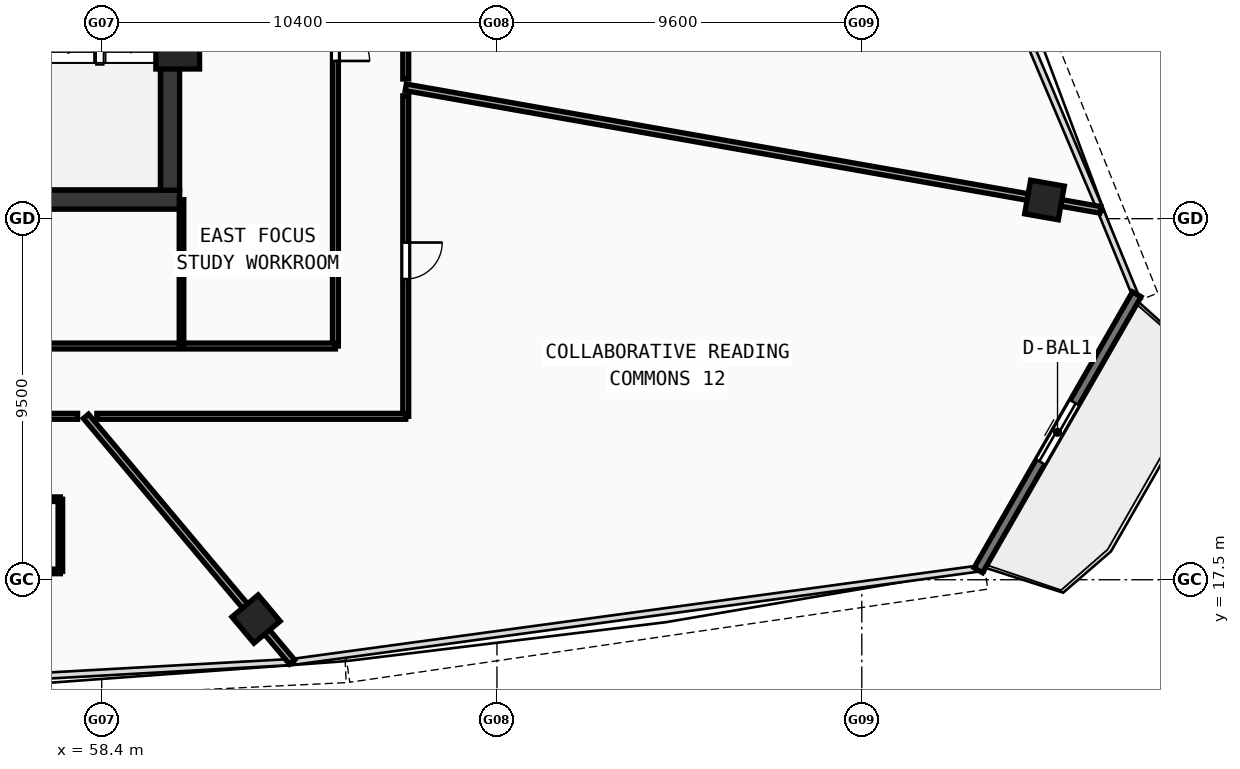
"""IFC4 building model, lengths in metres.
Left out: names, types, materials, properties, quantities, classifications, styles, units other than length and angle.
Written with IfcOpenShell. Run it as: python <this file> out.ifc"""

import sys

from ifc_helpers import new_model, si_unit, direction, frame, frame_2d, origin, origin_with_axes, origin_2d, place, context, subcontext, project, spatial, rectangle, hollow_rectangle, extrude, source, transform, mapped, element, fill, save


model = new_model("IFC4")
c1 = context("Model", 3, precision=1e-05, world=origin(), true_north=direction((0.0, 1.0)))
c2 = subcontext(c1, "Body", "Model", "MODEL_VIEW")
j1 = project(units=[si_unit("LENGTHUNIT", "METRE"), si_unit("PLANEANGLEUNIT", "RADIAN")], contexts=[c1])
p1 = place(None, origin())
s1 = spatial("IfcSite", under=j1, at=p1, CompositionType="ELEMENT")
p2 = place(p1, origin())
s2 = spatial("IfcBuilding", under=s1, at=p2, CompositionType="ELEMENT")
p3 = place(p2, frame((0.0, 0.0, 211.36)))
s3 = spatial("IfcBuildingStorey", under=s2, at=p3, CompositionType="ELEMENT", Elevation=211.36)
p4 = place(p3, frame((35.55, 27.5, 0.0), z_axis=(0.0, 0.0, 1.0), x_axis=(1.0, 0.0, 0.0)))
e1 = element("IfcWall", 1, at=p4, inside=s3, PredefinedType="SHEAR", context=c2, shape_type="SweptSolid", body=[
    extrude(rectangle(XDim=24.9, YDim=0.5, at=frame_2d((12.45, 0.0))), origin(), (0.0, 0.0, 1.0), 3.54),
])
p5 = place(p3, frame((60.2, 27.75, 0.0), z_axis=(0.0, 0.0, 1.0), x_axis=(0.0, 1.0, 0.0)))
e2 = element("IfcWall", 2, at=p5, inside=s3, PredefinedType="SHEAR", context=c2, shape_type="SweptSolid", body=[
    extrude(rectangle(XDim=12.2, YDim=0.5, at=frame_2d((6.1, 0.0))), origin(), (0.0, 0.0, 1.0), 3.54),
])
m1 = source(origin(), c2, "Body", "SweptSolid", [
    extrude(hollow_rectangle(XDim=1.15, YDim=1.15, WallThickness=0.048, at=origin_2d()), origin(), (0.0, 0.0, 1.0), 3.8),
])
p6 = place(p3, frame((60.4, 31.513, -0.26), z_axis=(0.0, 0.0, 1.0), x_axis=(1.0, 0.0, 0.0)))
e3 = element("IfcColumn", 3, at=p6, inside=s3, PredefinedType="COLUMN", context=c2, shape_type="MappedRepresentation", body=[
    mapped(m1, transform((0.0, 0.0, 0.0), scale=1.0)),
])
m2 = source(origin(), c2, "Body", "SweptSolid", [
    extrude(hollow_rectangle(XDim=0.9, YDim=0.9, WallThickness=0.036, at=origin_2d()), origin(), (0.0, 0.0, 1.0), 3.8),
])
for number, where, z_axis, x_axis in (
    (4, (62.461, 16.466, -0.26), (0.0, 0.0, 1.0), (0.766, 0.643, 0.0)),
    (5, (83.207, 27.492, -0.26), (0.0, 0.0, 1.0), (0.174, 0.985, 0.0)),
):
    element("IfcColumn", number, at=place(p3, frame(where, z_axis=z_axis, x_axis=x_axis)), inside=s3, PredefinedType="COLUMN", context=c2, shape_type="MappedRepresentation", body=[
        mapped(m2, transform((0.0, 0.0, 0.0), scale=1.0)),
    ])
p7 = place(p3, frame((81.466, 17.75, 0.0), z_axis=(0.0, 0.0, 1.0), x_axis=(0.497934125263, 0.867214856249, 0.0)))
e6 = element("IfcWall", 6, at=p7, inside=s3, PredefinedType="STANDARD", context=c2, shape_type="SweptSolid", body=[
    extrude(rectangle(XDim=8.373, YDim=0.26, at=frame_2d((4.186, 0.0))), origin(), (0.0, 0.0, 1.0), 3.54),
])
p8 = place(p7, frame((3.286, 0.0, 0.0)))
e7 = element("IfcOpeningElement", 7, at=p8, cuts=e6, PredefinedType="OPENING", context=c2, shape_type="SweptSolid", body=[
    extrude(rectangle(XDim=1.8, YDim=2.15, at=frame_2d((0.9, 1.075))), frame((0.0, 0.14, 0.0), z_axis=(0.0, -1.0, 0.0), x_axis=(1.0, 0.0, 0.0)), (0.0, 0.0, 1.0), 0.28),
])
p9 = place(p3, frame((64.55, 23.65, 0.0), z_axis=(0.0, 0.0, 1.0), x_axis=(0.0, 1.0, 0.0)))
e8 = element("IfcWall", 8, at=p9, inside=s3, PredefinedType="PARTITIONING", context=c2, shape_type="SweptSolid", body=[
    extrude(rectangle(XDim=16.6, YDim=0.155, at=frame_2d((8.3, 0.0))), origin(), (0.0, 0.0, 1.0), 2.89),
])
p10 = place(p9, frame((7.5, 0.0, 0.0)))
e9 = element("IfcOpeningElement", 9, at=p10, cuts=e8, PredefinedType="OPENING", context=c2, shape_type="SweptSolid", body=[
    extrude(rectangle(XDim=0.9, YDim=2.08, at=frame_2d((0.45, 1.04))), frame((0.0, 0.087, 0.0), z_axis=(0.0, -1.0, 0.0), x_axis=(1.0, 0.0, 0.0)), (0.0, 0.0, 1.0), 0.175),
])
p11 = place(p3, frame((31.45, 23.65, 0.0), z_axis=(0.0, 0.0, 1.0), x_axis=(1.0, 0.0, 0.0)))
e10 = element("IfcWall", 10, at=p11, inside=s3, PredefinedType="PARTITIONING", context=c2, shape_type="SweptSolid", body=[
    extrude(rectangle(XDim=33.1, YDim=0.155, at=frame_2d((16.55, 0.0))), origin(), (0.0, 0.0, 1.0), 2.89),
])
p12 = place(p11, frame((16.0, 0.0, 0.0)))
e11 = element("IfcOpeningElement", 11, at=p12, cuts=e10, PredefinedType="OPENING", context=c2, shape_type="SweptSolid", body=[
    extrude(rectangle(XDim=0.92, YDim=2.1, at=frame_2d((0.46, 1.05))), frame((0.0, 0.087, 0.0), z_axis=(0.0, -1.0, 0.0), x_axis=(1.0, 0.0, 0.0)), (0.0, 0.0, 1.0), 0.175),
])
p13 = place(p3, frame((60.5, 23.65, 0.0), z_axis=(0.0, 0.0, 1.0), x_axis=(0.0, 1.0, 0.0)))
e12 = element("IfcWall", 12, at=p13, inside=s3, PredefinedType="PARTITIONING", context=c2, shape_type="SweptSolid", body=[
    extrude(rectangle(XDim=3.85, YDim=0.12, at=frame_2d((1.925, 0.0))), origin(), (0.0, 0.0, 1.0), 3.14),
])
p14 = place(p3, frame((57.985, 21.8, 0.0), z_axis=(0.0, 0.0, 1.0), x_axis=(0.642770599155, -0.766058716328, 0.0)))
e13 = element("IfcWall", 13, at=p14, inside=s3, PredefinedType="PARTITIONING", context=c2, shape_type="SweptSolid", body=[
    extrude(rectangle(XDim=8.438, YDim=0.175, at=frame_2d((4.219, 0.0))), origin(), (0.0, 0.0, 1.0), 2.89),
])
p15 = place(p3, frame((66.4, 30.456, 0.0), z_axis=(0.0, 0.0, 1.0), x_axis=(0.984808051039, -0.173646487465, 0.0)))
e14 = element("IfcWall", 14, at=p15, inside=s3, PredefinedType="PARTITIONING", context=c2, shape_type="SweptSolid", body=[
    extrude(rectangle(XDim=18.557, YDim=0.175, at=frame_2d((9.279, 0.0))), origin(), (0.0, 0.0, 1.0), 2.89),
])
p16 = place(p3, frame((66.4, 44.104, 0.0), z_axis=(0.0, 0.0, 1.0), x_axis=(0.0, -1.0, 0.0)))
e15 = element("IfcWall", 15, at=p16, inside=s3, PredefinedType="PARTITIONING", context=c2, shape_type="SweptSolid", body=[
    extrude(rectangle(XDim=13.428, YDim=0.155, at=frame_2d((6.714, 0.0))), origin(), (0.0, 0.0, 1.0), 2.89),
])
p17 = place(p16, frame((6.239, 0.0, 0.0)))
e16 = element("IfcOpeningElement", 16, at=p17, cuts=e15, PredefinedType="OPENING", context=c2, shape_type="SweptSolid", body=[
    extrude(rectangle(XDim=0.96, YDim=2.12, at=frame_2d((0.48, 1.06))), frame((0.0, 0.087, 0.0), z_axis=(0.0, -1.0, 0.0), x_axis=(1.0, 0.0, 0.0)), (0.0, 0.0, 1.0), 0.175),
])
p18 = place(p3, frame((66.4, 30.232, 0.0), z_axis=(0.0, 0.0, 1.0), x_axis=(0.0, -1.0, 0.0)))
e17 = element("IfcWall", 17, at=p18, inside=s3, PredefinedType="PARTITIONING", context=c2, shape_type="SweptSolid", body=[
    extrude(rectangle(XDim=8.432, YDim=0.155, at=frame_2d((4.216, 0.0))), origin(), (0.0, 0.0, 1.0), 3.14),
])
p19 = place(p18, frame((3.859, 0.0, 0.0)))
e18 = element("IfcOpeningElement", 18, at=p19, cuts=e17, PredefinedType="OPENING", context=c2, shape_type="SweptSolid", body=[
    extrude(rectangle(XDim=0.96, YDim=2.12, at=frame_2d((0.48, 1.06))), frame((0.0, 0.087, 0.0), z_axis=(0.0, -1.0, 0.0), x_axis=(1.0, 0.0, 0.0)), (0.0, 0.0, 1.0), 0.175),
])
p20 = place(p3, frame((66.4, 21.8, 0.0), z_axis=(0.0, 0.0, 1.0), x_axis=(-1.0, 0.0, 0.0)))
e19 = element("IfcWall", 19, at=p20, inside=s3, PredefinedType="PARTITIONING", context=c2, shape_type="SweptSolid", body=[
    extrude(rectangle(XDim=8.127, YDim=0.155, at=frame_2d((4.064, 0.0))), origin(), (0.0, 0.0, 1.0), 3.14),
])
p21 = place(p3, frame((57.765, 21.8, 0.0), z_axis=(0.0, 0.0, 1.0), x_axis=(-1.0, 0.0, 0.0)))
e20 = element("IfcWall", 20, at=p21, inside=s3, PredefinedType="PARTITIONING", context=c2, shape_type="SweptSolid", body=[
    extrude(rectangle(XDim=6.349, YDim=0.155, at=frame_2d((3.174, 0.0))), origin(), (0.0, 0.0, 1.0), 2.89),
])
p22 = place(p21, frame((2.703, 0.0, 0.0)))
e21 = element("IfcOpeningElement", 21, at=p22, cuts=e20, PredefinedType="OPENING", context=c2, shape_type="SweptSolid", body=[
    extrude(rectangle(XDim=0.96, YDim=2.12, at=frame_2d((0.48, 1.06))), frame((0.0, 0.087, 0.0), z_axis=(0.0, -1.0, 0.0), x_axis=(1.0, 0.0, 0.0)), (0.0, 0.0, 1.0), 0.175),
])
p23 = place(p3, frame((55.262, 17.719, 0.0), z_axis=(0.0, 0.0, 1.0), x_axis=(1.0, 0.0, 0.0)))
e22 = element("IfcWall", 22, at=p23, inside=s3, PredefinedType="PARTITIONING", context=c2, shape_type="SweptSolid", body=[
    extrude(rectangle(XDim=2.05, YDim=0.12, at=frame_2d((1.025, 0.0))), origin(), (0.0, 0.0, 1.0), 3.54),
])
p24 = place(p23, frame((0.6, 0.0, 0.0)))
e23 = element("IfcOpeningElement", 23, at=p24, cuts=e22, PredefinedType="OPENING", context=c2, shape_type="SweptSolid", body=[
    extrude(rectangle(XDim=0.85, YDim=2.1, at=frame_2d((0.425, 1.05))), frame((0.0, 0.07, 0.0), z_axis=(0.0, -1.0, 0.0), x_axis=(1.0, 0.0, 0.0)), (0.0, 0.0, 1.0), 0.14),
])
p25 = place(p3, frame((57.312, 17.719, 0.0), z_axis=(0.0, 0.0, 1.0), x_axis=(0.0, 1.0, 0.0)))
e24 = element("IfcWall", 24, at=p25, inside=s3, PredefinedType="PARTITIONING", context=c2, shape_type="SweptSolid", body=[
    extrude(rectangle(XDim=1.9, YDim=0.12, at=frame_2d((0.95, 0.0))), origin(), (0.0, 0.0, 1.0), 3.54),
])
p26 = place(p3, frame((57.312, 19.619, 0.0), z_axis=(0.0, 0.0, 1.0), x_axis=(-1.0, 0.0, 0.0)))
e25 = element("IfcWall", 25, at=p26, inside=s3, PredefinedType="PARTITIONING", context=c2, shape_type="SweptSolid", body=[
    extrude(rectangle(XDim=2.05, YDim=0.12, at=frame_2d((1.025, 0.0))), origin(), (0.0, 0.0, 1.0), 3.54),
])
m3 = source(origin(), c2, "Body", "SweptSolid", [
    extrude(rectangle(XDim=1.8, YDim=2.15, at=frame_2d((0.9, 1.075))), frame((0.0, 0.025, 0.0), z_axis=(0.0, -1.0, 0.0), x_axis=(1.0, 0.0, 0.0)), (0.0, 0.0, 1.0), 0.05),
])
p27 = place(p8, origin_with_axes())
e26 = element("IfcDoor", 26, at=p27, inside=s3, OperationType="DOUBLE_DOOR_SLIDING", PredefinedType="DOOR", context=c2, shape_type="MappedRepresentation", body=[
    mapped(m3, transform((0.0, 0.0, 0.0), scale=1.0)),
])
fill(e7, e26)
m4 = source(origin(), c2, "Body", "SweptSolid", [
    extrude(rectangle(XDim=0.9, YDim=2.08, at=frame_2d((0.45, 1.04))), frame((0.0, 0.025, 0.0), z_axis=(0.0, -1.0, 0.0), x_axis=(1.0, 0.0, 0.0)), (0.0, 0.0, 1.0), 0.05),
])
p28 = place(p10, frame((0.9, 0.0, 0.0), z_axis=(0.0, 0.0, 1.0), x_axis=(-1.0, 0.0, 0.0)))
e27 = element("IfcDoor", 27, at=p28, inside=s3, OperationType="SINGLE_SWING_RIGHT", PredefinedType="DOOR", context=c2, shape_type="MappedRepresentation", body=[
    mapped(m4, transform((0.0, 0.0, 0.0), scale=1.0)),
])
fill(e9, e27)
m5 = source(origin(), c2, "Body", "SweptSolid", [
    extrude(rectangle(XDim=0.96, YDim=2.12, at=frame_2d((0.48, 1.06))), frame((0.0, 0.025, 0.0), z_axis=(0.0, -1.0, 0.0), x_axis=(1.0, 0.0, 0.0)), (0.0, 0.0, 1.0), 0.05),
])
p29 = place(p19, origin_with_axes())
e28 = element("IfcDoor", 28, at=p29, inside=s3, OperationType="SINGLE_SWING_LEFT", PredefinedType="DOOR", context=c2, shape_type="MappedRepresentation", body=[
    mapped(m5, transform((0.0, 0.0, 0.0), scale=1.0)),
])
fill(e18, e28)
save(model, sys.argv[1])
